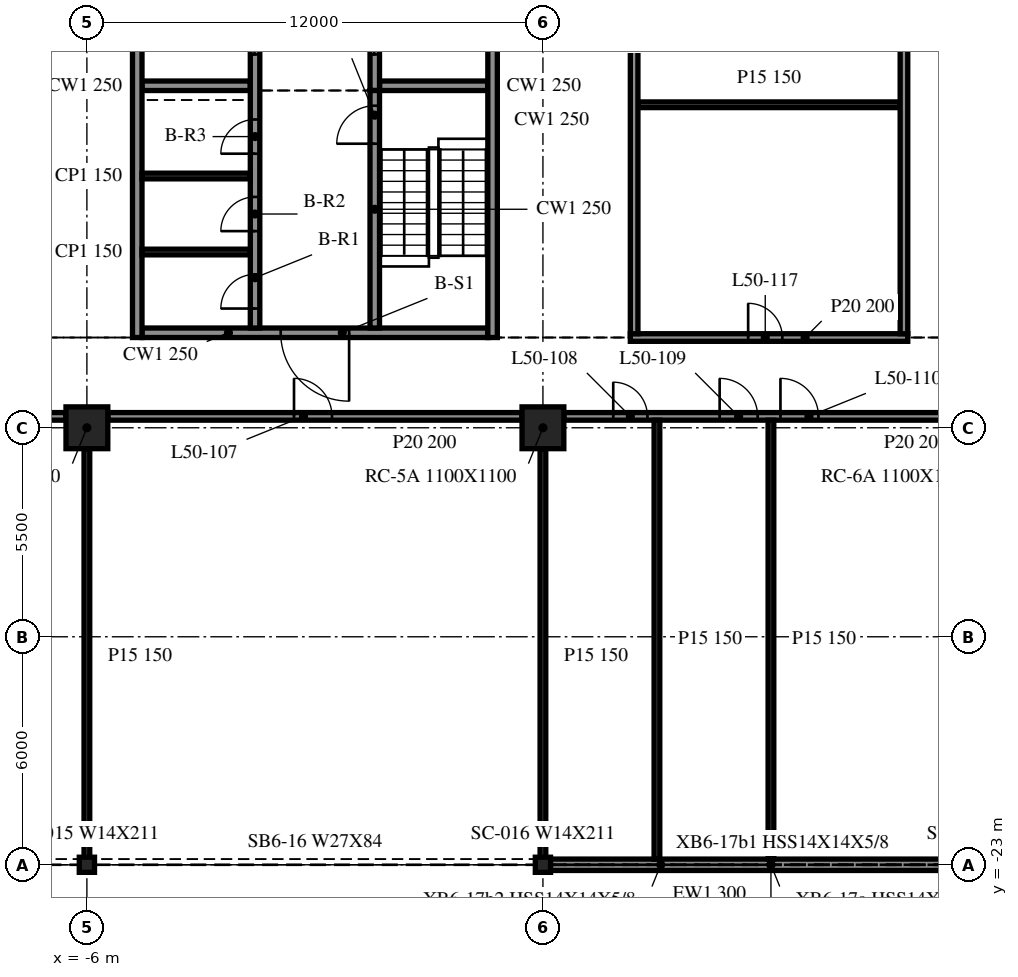
"""IFC4 building model, lengths in metres.
Left out: names, types, materials, properties, quantities, classifications, styles, units other than length and angle.
Written with IfcOpenShell. Run it as: python <this file> out.ifc"""

import sys

from ifc_helpers import new_model, si_unit, direction, frame, frame_2d, origin, origin_2d, place, context, subcontext, project, spatial, rectangle, i_section, extrude, element, fill, save


model = new_model("IFC4")
c1 = context("Model", 3, precision=1e-05, world=origin(), true_north=direction((0.0, 1.0)))
c2 = subcontext(c1, "Body", "Model", "MODEL_VIEW")
j1 = project(units=[si_unit("LENGTHUNIT", "METRE"), si_unit("PLANEANGLEUNIT", "RADIAN")], contexts=[c1])
p1 = place(None, origin())
s1 = spatial("IfcSite", under=j1, at=p1, CompositionType="ELEMENT")
p2 = place(p1, origin())
s2 = spatial("IfcBuilding", under=s1, at=p2, CompositionType="ELEMENT")
p3 = place(p2, frame((0.0, 0.0, 209.1)))
s3 = spatial("IfcBuildingStorey", under=s2, at=p3, CompositionType="ELEMENT", Elevation=209.1)
for number, where, z_axis, x_axis in (
    (1, (-6.0, -11.5, -0.34), (0.0, 0.0, 1.0), (1.0, 0.0, 0.0)),
    (2, (6.0, -11.5, -0.34), (0.0, 0.0, 1.0), (1.0, 0.0, 0.0)),
):
    element("IfcColumn", number, at=place(p3, frame(where, z_axis=z_axis, x_axis=x_axis)), inside=s3, PredefinedType="COLUMN", context=c2, shape_type="SweptSolid", body=[
        extrude(rectangle(XDim=1.1, YDim=1.1, at=origin_2d()), origin(), (0.0, 0.0, 1.0), 3.8),
    ])
for number, where, z_axis, x_axis in (
    (3, (-6.0, -23.0, -0.34), (0.0, 0.0, 1.0), (1.0, 0.0, 0.0)),
    (4, (6.0, -23.0, -0.34), (0.0, 0.0, 1.0), (1.0, 0.0, 0.0)),
):
    element("IfcColumn", number, at=place(p3, frame(where, z_axis=z_axis, x_axis=x_axis)), inside=s3, PredefinedType="COLUMN", context=c2, shape_type="SweptSolid", body=[
        extrude(i_section(OverallWidth=0.401, OverallDepth=0.399, WebThickness=0.025, FlangeThickness=0.04, at=origin_2d()), origin(), (0.0, 0.0, 1.0), 3.8),
    ])
p4 = place(p3, frame((6.012, -23.0, 0.0), z_axis=(0.0, 0.0, 1.0), x_axis=(1.0, 0.0, 0.0)))
e5 = element("IfcWall", 5, at=p4, inside=s3, PredefinedType="NOTDEFINED", context=c2, shape_type="SweptSolid", body=[
    extrude(rectangle(XDim=11.975, YDim=0.3, at=frame_2d((5.988, 0.0))), origin(), (0.0, 0.0, 1.0), 2.782),
])
for number, where, z_axis, x_axis in (
    (6, (-4.675, 15.125, 0.0), (0.0, 0.0, 1.0), (0.0, -1.0, 0.0)),
    (7, (4.675, -9.125, 0.0), (0.0, 0.0, 1.0), (0.0, 1.0, 0.0)),
):
    element("IfcWall", number, at=place(p3, frame(where, z_axis=z_axis, x_axis=x_axis)), inside=s3, PredefinedType="SOLIDWALL", context=c2, shape_type="SweptSolid", body=[
        extrude(rectangle(XDim=24.25, YDim=0.25, at=frame_2d((12.125, 0.0))), origin(), (0.0, 0.0, 1.0), 3.46),
    ])
p5 = place(p3, frame((4.55, -9.0, 0.0), z_axis=(0.0, 0.0, 1.0), x_axis=(-1.0, 0.0, 0.0)))
e8 = element("IfcWall", 8, at=p5, inside=s3, PredefinedType="SOLIDWALL", context=c2, shape_type="SweptSolid", body=[
    extrude(rectangle(XDim=9.1, YDim=0.25, at=frame_2d((4.55, 0.0))), origin(), (0.0, 0.0, 1.0), 3.46),
])
p6 = place(p5, frame((3.65, 0.0, 0.0)))
e9 = element("IfcOpeningElement", 9, at=p6, cuts=e8, PredefinedType="OPENING", context=c2, shape_type="SweptSolid", body=[
    extrude(rectangle(XDim=1.8, YDim=2.1, at=frame_2d((0.9, 1.05))), frame((0.0, 0.135, 0.0), z_axis=(0.0, -1.0, 0.0), x_axis=(1.0, 0.0, 0.0)), (0.0, 0.0, 1.0), 0.27),
])
p7 = place(p3, frame((-1.575, -8.875, 0.0), z_axis=(0.0, 0.0, 1.0), x_axis=(0.0, 1.0, 0.0)))
e10 = element("IfcWall", 10, at=p7, inside=s3, PredefinedType="SOLIDWALL", context=c2, shape_type="SweptSolid", body=[
    extrude(rectangle(XDim=23.75, YDim=0.25, at=frame_2d((11.875, 0.0))), origin(), (0.0, 0.0, 1.0), 3.46),
])
p8 = place(p7, frame((7.2, 0.0, 0.0)))
e11 = element("IfcOpeningElement", 11, at=p8, cuts=e10, PredefinedType="OPENING", context=c2, shape_type="SweptSolid", body=[
    extrude(rectangle(XDim=1.1, YDim=2.1, at=frame_2d((0.55, 1.05))), frame((0.0, 0.135, 0.0), z_axis=(0.0, -1.0, 0.0), x_axis=(1.0, 0.0, 0.0)), (0.0, 0.0, 1.0), 0.27),
])
p9 = place(p7, frame((9.95, 0.0, 0.0)))
e12 = element("IfcOpeningElement", 12, at=p9, cuts=e10, PredefinedType="OPENING", context=c2, shape_type="SweptSolid", body=[
    extrude(rectangle(XDim=1.1, YDim=2.1, at=frame_2d((0.55, 1.05))), frame((0.0, 0.135, 0.0), z_axis=(0.0, -1.0, 0.0), x_axis=(1.0, 0.0, 0.0)), (0.0, 0.0, 1.0), 0.27),
])
p10 = place(p7, frame((12.7, 0.0, 0.0)))
e13 = element("IfcOpeningElement", 13, at=p10, cuts=e10, PredefinedType="OPENING", context=c2, shape_type="SweptSolid", body=[
    extrude(rectangle(XDim=1.1, YDim=2.1, at=frame_2d((0.55, 1.05))), frame((0.0, 0.135, 0.0), z_axis=(0.0, -1.0, 0.0), x_axis=(1.0, 0.0, 0.0)), (0.0, 0.0, 1.0), 0.27),
])
p11 = place(p7, frame((15.45, 0.0, 0.0)))
e14 = element("IfcOpeningElement", 14, at=p11, cuts=e10, PredefinedType="OPENING", context=c2, shape_type="SweptSolid", body=[
    extrude(rectangle(XDim=1.1, YDim=2.1, at=frame_2d((0.55, 1.05))), frame((0.0, 0.135, 0.0), z_axis=(0.0, -1.0, 0.0), x_axis=(1.0, 0.0, 0.0)), (0.0, 0.0, 1.0), 0.27),
])
p12 = place(p7, frame((0.512, 0.0, 0.0)))
e15 = element("IfcOpeningElement", 15, at=p12, cuts=e10, PredefinedType="OPENING", context=c2, shape_type="SweptSolid", body=[
    extrude(rectangle(XDim=0.9, YDim=2.1, at=frame_2d((0.45, 1.05))), frame((0.0, 0.135, 0.0), z_axis=(0.0, -1.0, 0.0), x_axis=(1.0, 0.0, 0.0)), (0.0, 0.0, 1.0), 0.27),
])
p13 = place(p7, frame((2.55, 0.0, 0.0)))
e16 = element("IfcOpeningElement", 16, at=p13, cuts=e10, PredefinedType="OPENING", context=c2, shape_type="SweptSolid", body=[
    extrude(rectangle(XDim=0.9, YDim=2.1, at=frame_2d((0.45, 1.05))), frame((0.0, 0.135, 0.0), z_axis=(0.0, -1.0, 0.0), x_axis=(1.0, 0.0, 0.0)), (0.0, 0.0, 1.0), 0.27),
])
p14 = place(p7, frame((4.587, 0.0, 0.0)))
e17 = element("IfcOpeningElement", 17, at=p14, cuts=e10, PredefinedType="OPENING", context=c2, shape_type="SweptSolid", body=[
    extrude(rectangle(XDim=0.9, YDim=2.1, at=frame_2d((0.45, 1.05))), frame((0.0, 0.135, 0.0), z_axis=(0.0, -1.0, 0.0), x_axis=(1.0, 0.0, 0.0)), (0.0, 0.0, 1.0), 0.27),
])
p15 = place(p7, frame((19.262, 0.0, 0.0)))
e18 = element("IfcOpeningElement", 18, at=p15, cuts=e10, PredefinedType="OPENING", context=c2, shape_type="SweptSolid", body=[
    extrude(rectangle(XDim=0.9, YDim=2.1, at=frame_2d((0.45, 1.05))), frame((0.0, 0.135, 0.0), z_axis=(0.0, -1.0, 0.0), x_axis=(1.0, 0.0, 0.0)), (0.0, 0.0, 1.0), 0.27),
])
p16 = place(p7, frame((22.337, 0.0, 0.0)))
e19 = element("IfcOpeningElement", 19, at=p16, cuts=e10, PredefinedType="OPENING", context=c2, shape_type="SweptSolid", body=[
    extrude(rectangle(XDim=0.9, YDim=2.1, at=frame_2d((0.45, 1.05))), frame((0.0, 0.135, 0.0), z_axis=(0.0, -1.0, 0.0), x_axis=(1.0, 0.0, 0.0)), (0.0, 0.0, 1.0), 0.27),
])
p17 = place(p3, frame((1.575, -8.875, 0.0), z_axis=(0.0, 0.0, 1.0), x_axis=(0.0, 1.0, 0.0)))
e20 = element("IfcWall", 20, at=p17, inside=s3, PredefinedType="SOLIDWALL", context=c2, shape_type="SweptSolid", body=[
    extrude(rectangle(XDim=6.25, YDim=0.25, at=frame_2d((3.125, 0.0))), origin(), (0.0, 0.0, 1.0), 3.46),
])
p18 = place(p17, frame((4.85, 0.0, 0.0)))
e21 = element("IfcOpeningElement", 21, at=p18, cuts=e20, PredefinedType="OPENING", context=c2, shape_type="SweptSolid", body=[
    extrude(rectangle(XDim=1.0, YDim=2.1, at=frame_2d((0.5, 1.05))), frame((0.0, 0.135, 0.0), z_axis=(0.0, -1.0, 0.0), x_axis=(1.0, 0.0, 0.0)), (0.0, 0.0, 1.0), 0.27),
])
p19 = place(p3, frame((1.575, 14.875, 0.0), z_axis=(0.0, 0.0, 1.0), x_axis=(0.0, -1.0, 0.0)))
e22 = element("IfcWall", 22, at=p19, inside=s3, PredefinedType="SOLIDWALL", context=c2, shape_type="SweptSolid", body=[
    extrude(rectangle(XDim=17.5, YDim=0.25, at=frame_2d((8.75, 0.0))), origin(), (0.0, 0.0, 1.0), 3.46),
])
p20 = place(p19, frame((15.45, 0.0, 0.0)))
e23 = element("IfcOpeningElement", 23, at=p20, cuts=e22, PredefinedType="OPENING", context=c2, shape_type="SweptSolid", body=[
    extrude(rectangle(XDim=1.1, YDim=2.1, at=frame_2d((0.55, 1.05))), frame((0.0, 0.135, 0.0), z_axis=(0.0, -1.0, 0.0), x_axis=(1.0, 0.0, 0.0)), (0.0, 0.0, 1.0), 0.27),
])
p21 = place(p19, frame((12.7, 0.0, 0.0)))
e24 = element("IfcOpeningElement", 24, at=p21, cuts=e22, PredefinedType="OPENING", context=c2, shape_type="SweptSolid", body=[
    extrude(rectangle(XDim=1.1, YDim=2.1, at=frame_2d((0.55, 1.05))), frame((0.0, 0.135, 0.0), z_axis=(0.0, -1.0, 0.0), x_axis=(1.0, 0.0, 0.0)), (0.0, 0.0, 1.0), 0.27),
])
p22 = place(p19, frame((9.95, 0.0, 0.0)))
e25 = element("IfcOpeningElement", 25, at=p22, cuts=e22, PredefinedType="OPENING", context=c2, shape_type="SweptSolid", body=[
    extrude(rectangle(XDim=1.1, YDim=2.1, at=frame_2d((0.55, 1.05))), frame((0.0, 0.135, 0.0), z_axis=(0.0, -1.0, 0.0), x_axis=(1.0, 0.0, 0.0)), (0.0, 0.0, 1.0), 0.27),
])
p23 = place(p19, frame((7.2, 0.0, 0.0)))
e26 = element("IfcOpeningElement", 26, at=p23, cuts=e22, PredefinedType="OPENING", context=c2, shape_type="SweptSolid", body=[
    extrude(rectangle(XDim=1.1, YDim=2.1, at=frame_2d((0.55, 1.05))), frame((0.0, 0.135, 0.0), z_axis=(0.0, -1.0, 0.0), x_axis=(1.0, 0.0, 0.0)), (0.0, 0.0, 1.0), 0.27),
])
p24 = place(p19, frame((4.387, 0.0, 0.0)))
e27 = element("IfcOpeningElement", 27, at=p24, cuts=e22, PredefinedType="OPENING", context=c2, shape_type="SweptSolid", body=[
    extrude(rectangle(XDim=0.9, YDim=2.1, at=frame_2d((0.45, 1.05))), frame((0.0, 0.135, 0.0), z_axis=(0.0, -1.0, 0.0), x_axis=(1.0, 0.0, 0.0)), (0.0, 0.0, 1.0), 0.27),
])
p25 = place(p19, frame((1.312, 0.0, 0.0)))
e28 = element("IfcOpeningElement", 28, at=p25, cuts=e22, PredefinedType="OPENING", context=c2, shape_type="SweptSolid", body=[
    extrude(rectangle(XDim=0.9, YDim=2.1, at=frame_2d((0.45, 1.05))), frame((0.0, 0.135, 0.0), z_axis=(0.0, -1.0, 0.0), x_axis=(1.0, 0.0, 0.0)), (0.0, 0.0, 1.0), 0.27),
])
for number, where, z_axis, x_axis in (
    (29, (-4.55, -2.5, 0.0), (0.0, 0.0, 1.0), (1.0, 0.0, 0.0)),
    (30, (1.7, -2.5, 0.0), (0.0, 0.0, 1.0), (1.0, 0.0, 0.0)),
):
    element("IfcWall", number, at=place(p3, frame(where, z_axis=z_axis, x_axis=x_axis)), inside=s3, PredefinedType="SOLIDWALL", context=c2, shape_type="SweptSolid", body=[
        extrude(rectangle(XDim=2.85, YDim=0.25, at=frame_2d((1.425, 0.0))), origin(), (0.0, 0.0, 1.0), 3.46),
    ])
for number, where, z_axis, x_axis in (
    (31, (-4.55, -6.875, 0.0), (0.0, 0.0, 1.0), (1.0, 0.0, 0.0)),
    (32, (-4.55, -4.875, 0.0), (0.0, 0.0, 1.0), (1.0, 0.0, 0.0)),
):
    element("IfcWall", number, at=place(p3, frame(where, z_axis=z_axis, x_axis=x_axis)), inside=s3, PredefinedType="PARTITIONING", context=c2, shape_type="SweptSolid", body=[
        extrude(rectangle(XDim=2.85, YDim=0.15, at=frame_2d((1.425, 0.0))), origin(), (0.0, 0.0, 1.0), 3.46),
    ])
p26 = place(p3, frame((-17.45, -11.2, 0.0), z_axis=(0.0, 0.0, 1.0), x_axis=(1.0, 0.0, 0.0)))
e33 = element("IfcWall", 33, at=p26, inside=s3, PredefinedType="PARTITIONING", context=c2, shape_type="SweptSolid", body=[
    extrude(rectangle(XDim=10.9, YDim=0.2, at=frame_2d((5.45, 0.0))), origin(), (0.0, 0.0, 1.0), 3.46),
])
p27 = place(p26, frame((1.1, 0.0, 0.0)))
e34 = element("IfcOpeningElement", 34, at=p27, cuts=e33, PredefinedType="OPENING", context=c2, shape_type="SweptSolid", body=[
    extrude(rectangle(XDim=1.0, YDim=2.1, at=frame_2d((0.5, 1.05))), frame((0.0, 0.11, 0.0), z_axis=(0.0, -1.0, 0.0), x_axis=(1.0, 0.0, 0.0)), (0.0, 0.0, 1.0), 0.22),
])
p28 = place(p26, frame((4.1, 0.0, 0.0)))
e35 = element("IfcOpeningElement", 35, at=p28, cuts=e33, PredefinedType="OPENING", context=c2, shape_type="SweptSolid", body=[
    extrude(rectangle(XDim=1.0, YDim=2.1, at=frame_2d((0.5, 1.05))), frame((0.0, 0.11, 0.0), z_axis=(0.0, -1.0, 0.0), x_axis=(1.0, 0.0, 0.0)), (0.0, 0.0, 1.0), 0.22),
])
p29 = place(p26, frame((5.7, 0.0, 0.0)))
e36 = element("IfcOpeningElement", 36, at=p29, cuts=e33, PredefinedType="OPENING", context=c2, shape_type="SweptSolid", body=[
    extrude(rectangle(XDim=0.9, YDim=2.1, at=frame_2d((0.45, 1.05))), frame((0.0, 0.11, 0.0), z_axis=(0.0, -1.0, 0.0), x_axis=(1.0, 0.0, 0.0)), (0.0, 0.0, 1.0), 0.22),
])
p30 = place(p3, frame((-5.45, -11.2, 0.0), z_axis=(0.0, 0.0, 1.0), x_axis=(1.0, 0.0, 0.0)))
e37 = element("IfcWall", 37, at=p30, inside=s3, PredefinedType="PARTITIONING", context=c2, shape_type="SweptSolid", body=[
    extrude(rectangle(XDim=10.9, YDim=0.2, at=frame_2d((5.45, 0.0))), origin(), (0.0, 0.0, 1.0), 3.46),
])
p31 = place(p30, frame((4.9, 0.0, 0.0)))
e38 = element("IfcOpeningElement", 38, at=p31, cuts=e37, PredefinedType="OPENING", context=c2, shape_type="SweptSolid", body=[
    extrude(rectangle(XDim=1.0, YDim=2.1, at=frame_2d((0.5, 1.05))), frame((0.0, 0.11, 0.0), z_axis=(0.0, -1.0, 0.0), x_axis=(1.0, 0.0, 0.0)), (0.0, 0.0, 1.0), 0.22),
])
p32 = place(p3, frame((6.55, -11.2, 0.0), z_axis=(0.0, 0.0, 1.0), x_axis=(1.0, 0.0, 0.0)))
e39 = element("IfcWall", 39, at=p32, inside=s3, PredefinedType="PARTITIONING", context=c2, shape_type="SweptSolid", body=[
    extrude(rectangle(XDim=10.9, YDim=0.2, at=frame_2d((5.45, 0.0))), origin(), (0.0, 0.0, 1.0), 3.46),
])
p33 = place(p32, frame((1.3, 0.0, 0.0)))
e40 = element("IfcOpeningElement", 40, at=p33, cuts=e39, PredefinedType="OPENING", context=c2, shape_type="SweptSolid", body=[
    extrude(rectangle(XDim=0.9, YDim=2.1, at=frame_2d((0.45, 1.05))), frame((0.0, 0.11, 0.0), z_axis=(0.0, -1.0, 0.0), x_axis=(1.0, 0.0, 0.0)), (0.0, 0.0, 1.0), 0.22),
])
p34 = place(p32, frame((4.1, 0.0, 0.0)))
e41 = element("IfcOpeningElement", 41, at=p34, cuts=e39, PredefinedType="OPENING", context=c2, shape_type="SweptSolid", body=[
    extrude(rectangle(XDim=1.0, YDim=2.1, at=frame_2d((0.5, 1.05))), frame((0.0, 0.11, 0.0), z_axis=(0.0, -1.0, 0.0), x_axis=(1.0, 0.0, 0.0)), (0.0, 0.0, 1.0), 0.22),
])
p35 = place(p32, frame((5.7, 0.0, 0.0)))
e42 = element("IfcOpeningElement", 42, at=p35, cuts=e39, PredefinedType="OPENING", context=c2, shape_type="SweptSolid", body=[
    extrude(rectangle(XDim=1.0, YDim=2.1, at=frame_2d((0.5, 1.05))), frame((0.0, 0.11, 0.0), z_axis=(0.0, -1.0, 0.0), x_axis=(1.0, 0.0, 0.0)), (0.0, 0.0, 1.0), 0.22),
])
p36 = place(p3, frame((8.3, -9.125, 0.0), z_axis=(0.0, 0.0, 1.0), x_axis=(1.0, 0.0, 0.0)))
e43 = element("IfcWall", 43, at=p36, inside=s3, PredefinedType="PARTITIONING", context=c2, shape_type="SweptSolid", body=[
    extrude(rectangle(XDim=7.3, YDim=0.2, at=frame_2d((3.65, 0.0))), origin(), (0.0, 0.0, 1.0), 3.46),
])
p37 = place(p36, frame((3.1, 0.0, 0.0)))
e44 = element("IfcOpeningElement", 44, at=p37, cuts=e43, PredefinedType="OPENING", context=c2, shape_type="SweptSolid", body=[
    extrude(rectangle(XDim=0.9, YDim=2.1, at=frame_2d((0.45, 1.05))), frame((0.0, 0.11, 0.0), z_axis=(0.0, -1.0, 0.0), x_axis=(1.0, 0.0, 0.0)), (0.0, 0.0, 1.0), 0.22),
])
p38 = place(p3, frame((8.5, -3.0, 0.0), z_axis=(0.0, 0.0, 1.0), x_axis=(1.0, 0.0, 0.0)))
e45 = element("IfcWall", 45, at=p38, inside=s3, PredefinedType="PARTITIONING", context=c2, shape_type="SweptSolid", body=[
    extrude(rectangle(XDim=6.9, YDim=0.15, at=frame_2d((3.45, 0.0))), origin(), (0.0, 0.0, 1.0), 3.46),
])
for number, where, z_axis, x_axis in (
    (46, (-6.0, -22.975, 0.0), (0.0, 0.0, 1.0), (0.0, 1.0, 0.0)),
    (47, (6.0, -22.975, 0.0), (0.0, 0.0, 1.0), (0.0, 1.0, 0.0)),
):
    element("IfcWall", number, at=place(p3, frame(where, z_axis=z_axis, x_axis=x_axis)), inside=s3, PredefinedType="PARTITIONING", context=c2, shape_type="SweptSolid", body=[
        extrude(rectangle(XDim=10.925, YDim=0.15, at=frame_2d((5.462, 0.0))), origin(), (0.0, 0.0, 1.0), 3.46),
    ])
p39 = place(p3, frame((8.4, -9.025, 0.0), z_axis=(0.0, 0.0, 1.0), x_axis=(0.0, 1.0, 0.0)))
e48 = element("IfcWall", 48, at=p39, inside=s3, PredefinedType="PARTITIONING", context=c2, shape_type="SweptSolid", body=[
    extrude(rectangle(XDim=24.05, YDim=0.2, at=frame_2d((12.025, 0.0))), origin(), (0.0, 0.0, 1.0), 3.46),
])
p40 = place(p39, frame((11.5, 0.0, 0.0)))
e49 = element("IfcOpeningElement", 49, at=p40, cuts=e48, PredefinedType="OPENING", context=c2, shape_type="SweptSolid", body=[
    extrude(rectangle(XDim=0.9, YDim=2.1, at=frame_2d((0.45, 1.05))), frame((0.0, 0.11, 0.0), z_axis=(0.0, -1.0, 0.0), x_axis=(1.0, 0.0, 0.0)), (0.0, 0.0, 1.0), 0.22),
])
for number, where, z_axis, x_axis in (
    (50, (9.0, -22.85, 0.0), (0.0, 0.0, 1.0), (0.0, 1.0, 0.0)),
    (51, (12.0, -22.85, 0.0), (0.0, 0.0, 1.0), (0.0, 1.0, 0.0)),
):
    element("IfcWall", number, at=place(p3, frame(where, z_axis=z_axis, x_axis=x_axis)), inside=s3, PredefinedType="PARTITIONING", context=c2, shape_type="SweptSolid", body=[
        extrude(rectangle(XDim=11.55, YDim=0.15, at=frame_2d((5.775, 0.0))), origin(), (0.0, 0.0, 1.0), 3.46),
    ])
p41 = place(p3, frame((15.5, -9.025, 0.0), z_axis=(0.0, 0.0, 1.0), x_axis=(0.0, 1.0, 0.0)))
e52 = element("IfcWall", 52, at=p41, inside=s3, PredefinedType="PARTITIONING", context=c2, shape_type="SweptSolid", body=[
    extrude(rectangle(XDim=24.05, YDim=0.2, at=frame_2d((12.025, 0.0))), origin(), (0.0, 0.0, 1.0), 3.46),
])
p42 = place(p6, origin())
e53 = element("IfcDoor", 53, at=p42, inside=s3, OperationType="DOUBLE_DOOR_SINGLE_SWING", PredefinedType="DOOR", context=c2, shape_type="SweptSolid", body=[
    extrude(rectangle(XDim=1.8, YDim=2.1, at=frame_2d((0.9, 1.05))), frame((0.0, 0.025, 0.0), z_axis=(0.0, -1.0, 0.0), x_axis=(1.0, 0.0, 0.0)), (0.0, 0.0, 1.0), 0.05),
])
fill(e9, e53)
p43 = place(p20, origin())
e54 = element("IfcDoor", 54, at=p43, inside=s3, OperationType="DOUBLE_DOOR_SLIDING", PredefinedType="DOOR", context=c2, shape_type="SweptSolid", body=[
    extrude(rectangle(XDim=1.1, YDim=2.1, at=frame_2d((0.55, 1.05))), frame((0.0, 0.025, 0.0), z_axis=(0.0, -1.0, 0.0), x_axis=(1.0, 0.0, 0.0)), (0.0, 0.0, 1.0), 0.05),
])
fill(e23, e54)
p44 = place(p8, origin())
e55 = element("IfcDoor", 55, at=p44, inside=s3, OperationType="DOUBLE_DOOR_SLIDING", PredefinedType="DOOR", context=c2, shape_type="SweptSolid", body=[
    extrude(rectangle(XDim=1.1, YDim=2.1, at=frame_2d((0.55, 1.05))), frame((0.0, 0.025, 0.0), z_axis=(0.0, -1.0, 0.0), x_axis=(1.0, 0.0, 0.0)), (0.0, 0.0, 1.0), 0.05),
])
fill(e11, e55)
p45 = place(p12, origin())
e56 = element("IfcDoor", 56, at=p45, inside=s3, OperationType="SINGLE_SWING_LEFT", PredefinedType="DOOR", context=c2, shape_type="SweptSolid", body=[
    extrude(rectangle(XDim=0.9, YDim=2.1, at=frame_2d((0.45, 1.05))), frame((0.0, 0.025, 0.0), z_axis=(0.0, -1.0, 0.0), x_axis=(1.0, 0.0, 0.0)), (0.0, 0.0, 1.0), 0.05),
])
fill(e15, e56)
p46 = place(p13, origin())
e57 = element("IfcDoor", 57, at=p46, inside=s3, OperationType="SINGLE_SWING_RIGHT", PredefinedType="DOOR", context=c2, shape_type="SweptSolid", body=[
    extrude(rectangle(XDim=0.9, YDim=2.1, at=frame_2d((0.45, 1.05))), frame((0.0, 0.025, 0.0), z_axis=(0.0, -1.0, 0.0), x_axis=(1.0, 0.0, 0.0)), (0.0, 0.0, 1.0), 0.05),
])
fill(e16, e57)
p47 = place(p14, origin())
e58 = element("IfcDoor", 58, at=p47, inside=s3, OperationType="SINGLE_SWING_LEFT", PredefinedType="DOOR", context=c2, shape_type="SweptSolid", body=[
    extrude(rectangle(XDim=0.9, YDim=2.1, at=frame_2d((0.45, 1.05))), frame((0.0, 0.025, 0.0), z_axis=(0.0, -1.0, 0.0), x_axis=(1.0, 0.0, 0.0)), (0.0, 0.0, 1.0), 0.05),
])
fill(e17, e58)
p48 = place(p18, origin())
e59 = element("IfcDoor", 59, at=p48, inside=s3, OperationType="SINGLE_SWING_RIGHT", PredefinedType="DOOR", context=c2, shape_type="SweptSolid", body=[
    extrude(rectangle(XDim=1.0, YDim=2.1, at=frame_2d((0.5, 1.05))), frame((0.0, 0.025, 0.0), z_axis=(0.0, -1.0, 0.0), x_axis=(1.0, 0.0, 0.0)), (0.0, 0.0, 1.0), 0.05),
])
fill(e21, e59)
p49 = place(p31, origin())
e60 = element("IfcDoor", 60, at=p49, inside=s3, OperationType="SINGLE_SWING_RIGHT", PredefinedType="DOOR", context=c2, shape_type="SweptSolid", body=[
    extrude(rectangle(XDim=1.0, YDim=2.1, at=frame_2d((0.5, 1.05))), frame((0.0, 0.025, 0.0), z_axis=(0.0, -1.0, 0.0), x_axis=(1.0, 0.0, 0.0)), (0.0, 0.0, 1.0), 0.05),
])
fill(e38, e60)
p50 = place(p33, origin())
e61 = element("IfcDoor", 61, at=p50, inside=s3, OperationType="SINGLE_SWING_RIGHT", PredefinedType="DOOR", context=c2, shape_type="SweptSolid", body=[
    extrude(rectangle(XDim=0.9, YDim=2.1, at=frame_2d((0.45, 1.05))), frame((0.0, 0.025, 0.0), z_axis=(0.0, -1.0, 0.0), x_axis=(1.0, 0.0, 0.0)), (0.0, 0.0, 1.0), 0.05),
])
fill(e40, e61)
p51 = place(p34, origin())
e62 = element("IfcDoor", 62, at=p51, inside=s3, OperationType="SINGLE_SWING_RIGHT", PredefinedType="DOOR", context=c2, shape_type="SweptSolid", body=[
    extrude(rectangle(XDim=1.0, YDim=2.1, at=frame_2d((0.5, 1.05))), frame((0.0, 0.025, 0.0), z_axis=(0.0, -1.0, 0.0), x_axis=(1.0, 0.0, 0.0)), (0.0, 0.0, 1.0), 0.05),
])
fill(e41, e62)
p52 = place(p35, origin())
e63 = element("IfcDoor", 63, at=p52, inside=s3, OperationType="SINGLE_SWING_LEFT", PredefinedType="DOOR", context=c2, shape_type="SweptSolid", body=[
    extrude(rectangle(XDim=1.0, YDim=2.1, at=frame_2d((0.5, 1.05))), frame((0.0, 0.025, 0.0), z_axis=(0.0, -1.0, 0.0), x_axis=(1.0, 0.0, 0.0)), (0.0, 0.0, 1.0), 0.05),
])
fill(e42, e63)
p53 = place(p37, origin())
e64 = element("IfcDoor", 64, at=p53, inside=s3, OperationType="SINGLE_SWING_LEFT", PredefinedType="DOOR", context=c2, shape_type="SweptSolid", body=[
    extrude(rectangle(XDim=0.9, YDim=2.1, at=frame_2d((0.45, 1.05))), frame((0.0, 0.025, 0.0), z_axis=(0.0, -1.0, 0.0), x_axis=(1.0, 0.0, 0.0)), (0.0, 0.0, 1.0), 0.05),
])
fill(e44, e64)
save(model, sys.argv[1])
